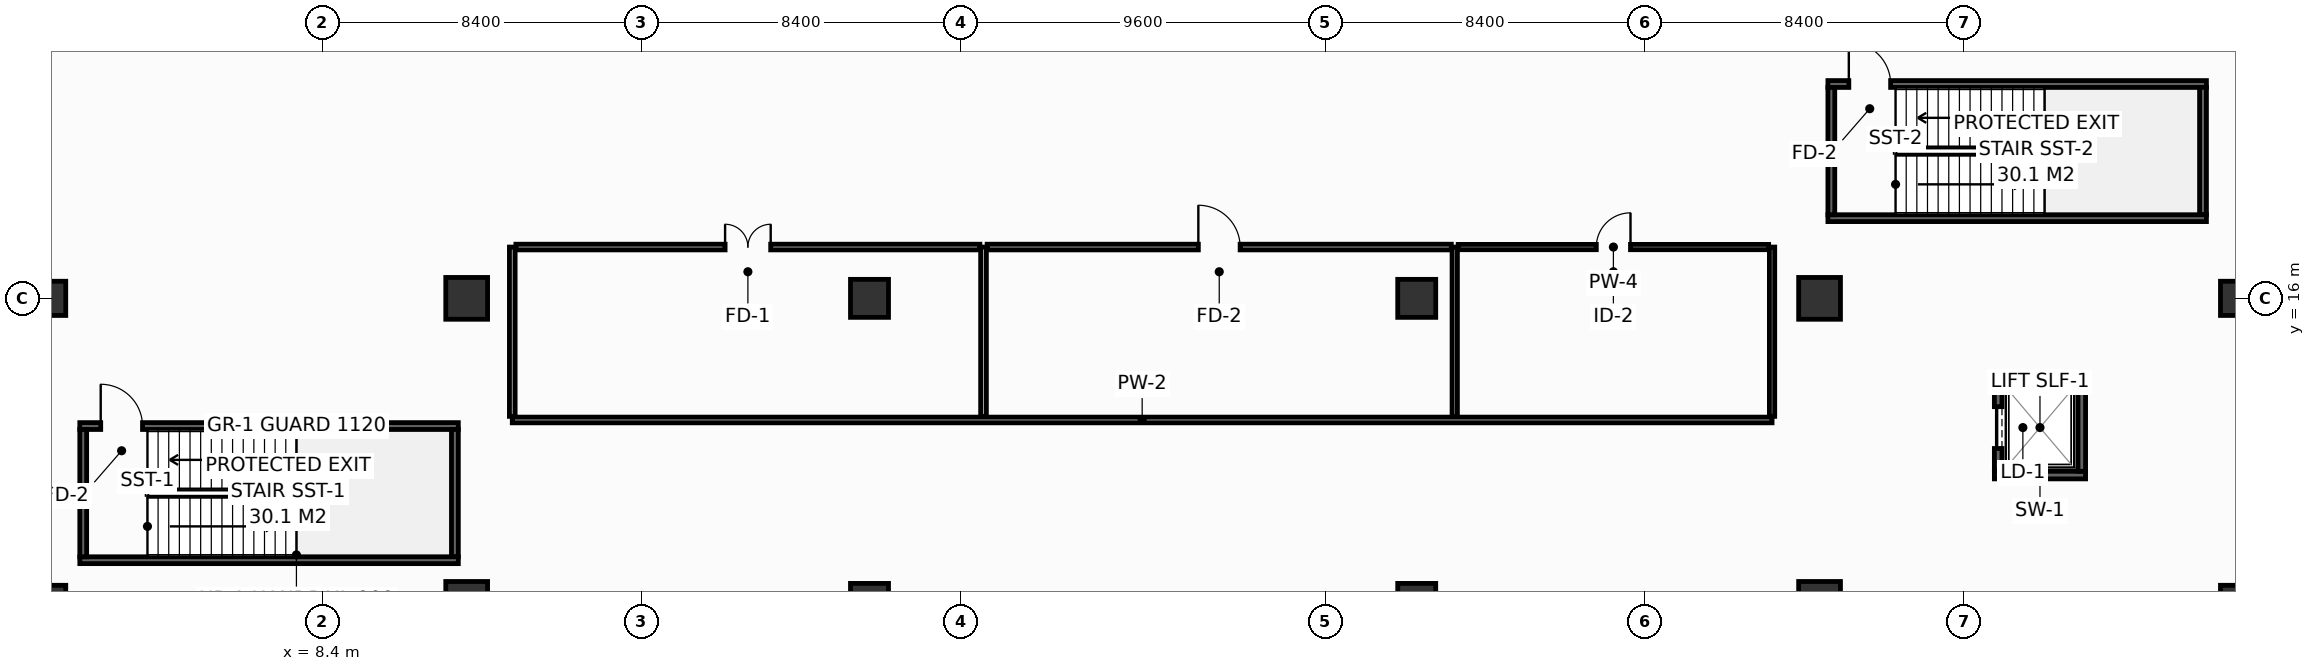
"""IFC4 building model, lengths in metres.
Left out: names, types, materials, properties, quantities, classifications, styles, units other than length and angle.
Written with IfcOpenShell. Run it as: python <this file> out.ifc"""

import sys

from ifc_helpers import new_model, si_unit, direction, frame, frame_2d, origin, origin_2d, place, context, subcontext, project, spatial, rectangle, extrude, element, fill, save


model = new_model("IFC4")
c1 = context("Model", 3, precision=1e-05, world=origin(), true_north=direction((0.0, 1.0)))
c2 = subcontext(c1, "Body", "Model", "MODEL_VIEW")
j1 = project(units=[si_unit("LENGTHUNIT", "METRE"), si_unit("PLANEANGLEUNIT", "RADIAN")], contexts=[c1])
p1 = place(None, origin())
s1 = spatial("IfcSite", under=j1, at=p1, CompositionType="ELEMENT")
p2 = place(p1, origin())
s2 = spatial("IfcBuilding", under=s1, at=p2, CompositionType="ELEMENT")
p3 = place(p2, frame((0.0, 0.0, -5.4)))
s3 = spatial("IfcBuildingStorey", under=s2, at=p3, CompositionType="ELEMENT", Elevation=-5.4)
p4 = place(p3, frame((12.2, 8.0, 0.0), z_axis=(0.0, 0.0, 1.0), x_axis=(1.0, 0.0, 0.0)))
e1 = element("IfcColumn", 1, at=p4, inside=s3, PredefinedType="COLUMN", context=c2, shape_type="SweptSolid", body=[
    extrude(rectangle(XDim=1.1, YDim=1.1, at=origin_2d()), origin(), (0.0, 0.0, 1.0), 5.4),
])
for number, where, z_axis, x_axis in (
    (2, (22.8, 8.0, 0.0), (0.0, 0.0, 1.0), (1.0, 0.0, 0.0)),
    (3, (37.2, 8.0, 0.0), (0.0, 0.0, 1.0), (1.0, 0.0, 0.0)),
):
    element("IfcColumn", number, at=place(p3, frame(where, z_axis=z_axis, x_axis=x_axis)), inside=s3, PredefinedType="COLUMN", context=c2, shape_type="SweptSolid", body=[
        extrude(rectangle(XDim=1.0, YDim=1.0, at=origin_2d()), origin(), (0.0, 0.0, 1.0), 5.4),
    ])
for number, where, z_axis, x_axis in (
    (4, (47.8, 8.0, 0.0), (0.0, 0.0, 1.0), (1.0, 0.0, 0.0)),
    (5, (12.2, 16.0, 0.0), (0.0, 0.0, 1.0), (1.0, 0.0, 0.0)),
):
    element("IfcColumn", number, at=place(p3, frame(where, z_axis=z_axis, x_axis=x_axis)), inside=s3, PredefinedType="COLUMN", context=c2, shape_type="SweptSolid", body=[
        extrude(rectangle(XDim=1.1, YDim=1.1, at=origin_2d()), origin(), (0.0, 0.0, 1.0), 5.4),
    ])
for number, where, z_axis, x_axis in (
    (6, (22.8, 16.0, 0.0), (0.0, 0.0, 1.0), (1.0, 0.0, 0.0)),
    (7, (37.2, 16.0, 0.0), (0.0, 0.0, 1.0), (1.0, 0.0, 0.0)),
):
    element("IfcColumn", number, at=place(p3, frame(where, z_axis=z_axis, x_axis=x_axis)), inside=s3, PredefinedType="COLUMN", context=c2, shape_type="SweptSolid", body=[
        extrude(rectangle(XDim=1.0, YDim=1.0, at=origin_2d()), origin(), (0.0, 0.0, 1.0), 5.4),
    ])
p5 = place(p3, frame((47.8, 16.0, 0.0), z_axis=(0.0, 0.0, 1.0), x_axis=(1.0, 0.0, 0.0)))
e8 = element("IfcColumn", 8, at=p5, inside=s3, PredefinedType="COLUMN", context=c2, shape_type="SweptSolid", body=[
    extrude(rectangle(XDim=1.1, YDim=1.1, at=origin_2d()), origin(), (0.0, 0.0, 1.0), 5.4),
])
for number, where, z_axis, x_axis in (
    (9, (1.2, 8.0, 0.0), (0.0, 0.0, 1.0), (1.0, 0.0, 0.0)),
    (10, (58.8, 8.0, 0.0), (0.0, 0.0, 1.0), (1.0, 0.0, 0.0)),
    (11, (1.2, 16.0, 0.0), (0.0, 0.0, 1.0), (1.0, 0.0, 0.0)),
    (12, (58.8, 16.0, 0.0), (0.0, 0.0, 1.0), (1.0, 0.0, 0.0)),
):
    element("IfcColumn", number, at=place(p3, frame(where, z_axis=z_axis, x_axis=x_axis)), inside=s3, PredefinedType="COLUMN", context=c2, shape_type="SweptSolid", body=[
        extrude(rectangle(XDim=0.9, YDim=0.9, at=origin_2d()), origin(), (0.0, 0.0, 1.0), 5.4),
    ])
for number, where, z_axis, x_axis in (
    (13, (52.4, 11.35, 0.0), (0.0, 0.0, 1.0), (1.0, 0.0, 0.0)),
    (14, (52.4, 13.85, 0.0), (0.0, 0.0, 1.0), (1.0, 0.0, 0.0)),
):
    element("IfcWall", number, at=place(p3, frame(where, z_axis=z_axis, x_axis=x_axis)), inside=s3, PredefinedType="SHEAR", context=c2, shape_type="SweptSolid", body=[
        extrude(rectangle(XDim=2.4, YDim=0.2, at=frame_2d((1.2, 0.0))), origin(), (0.0, 0.0, 1.0), 5.05),
    ])
p6 = place(p3, frame((52.5, 11.45, 0.0), z_axis=(0.0, 0.0, 1.0), x_axis=(0.0, 1.0, 0.0)))
e15 = element("IfcWall", 15, at=p6, inside=s3, PredefinedType="SHEAR", context=c2, shape_type="SweptSolid", body=[
    extrude(rectangle(XDim=2.3, YDim=0.2, at=frame_2d((1.15, 0.0))), origin(), (0.0, 0.0, 1.0), 5.05),
])
p7 = place(p6, frame((0.6, 0.0, 0.0)))
e16 = element("IfcOpeningElement", 16, at=p7, cuts=e15, PredefinedType="OPENING", context=c2, shape_type="SweptSolid", body=[
    extrude(rectangle(XDim=1.1, YDim=2.2, at=frame_2d((0.55, 1.1))), frame((0.0, 0.11, 0.0), z_axis=(0.0, -1.0, 0.0), x_axis=(1.0, 0.0, 0.0)), (0.0, 0.0, 1.0), 0.22),
])
p8 = place(p3, frame((54.7, 11.45, 0.0), z_axis=(0.0, 0.0, 1.0), x_axis=(0.0, 1.0, 0.0)))
e17 = element("IfcWall", 17, at=p8, inside=s3, PredefinedType="SHEAR", context=c2, shape_type="SweptSolid", body=[
    extrude(rectangle(XDim=2.3, YDim=0.2, at=frame_2d((1.15, 0.0))), origin(), (0.0, 0.0, 1.0), 5.05),
])
p9 = place(p3, frame((2.02, 12.64, 0.0), z_axis=(0.0, 0.0, 1.0), x_axis=(1.0, 0.0, 0.0)))
e18 = element("IfcWall", 18, at=p9, inside=s3, PredefinedType="SHEAR", context=c2, shape_type="SweptSolid", body=[
    extrude(rectangle(XDim=9.96, YDim=0.18, at=frame_2d((4.98, 0.0))), origin(), (0.0, 0.0, 1.0), 5.05),
])
p10 = place(p9, frame((0.55, 0.0, 0.0)))
e19 = element("IfcOpeningElement", 19, at=p10, cuts=e18, PredefinedType="OPENING", context=c2, shape_type="SweptSolid", body=[
    extrude(rectangle(XDim=1.1, YDim=2.15, at=frame_2d((0.55, 1.075))), frame((0.0, 0.1, 0.0), z_axis=(0.0, -1.0, 0.0), x_axis=(1.0, 0.0, 0.0)), (0.0, 0.0, 1.0), 0.2),
])
p11 = place(p3, frame((11.89, 12.55, 0.0), z_axis=(0.0, 0.0, 1.0), x_axis=(0.0, -1.0, 0.0)))
e20 = element("IfcWall", 20, at=p11, inside=s3, PredefinedType="SHEAR", context=c2, shape_type="SweptSolid", body=[
    extrude(rectangle(XDim=3.35, YDim=0.18, at=frame_2d((1.675, 0.0))), origin(), (0.0, 0.0, 1.0), 5.05),
])
p12 = place(p3, frame((11.98, 9.11, 0.0), z_axis=(0.0, 0.0, 1.0), x_axis=(-1.0, 0.0, 0.0)))
e21 = element("IfcWall", 21, at=p12, inside=s3, PredefinedType="SHEAR", context=c2, shape_type="SweptSolid", body=[
    extrude(rectangle(XDim=9.96, YDim=0.18, at=frame_2d((4.98, 0.0))), origin(), (0.0, 0.0, 1.0), 5.05),
])
p13 = place(p3, frame((2.11, 9.2, 0.0), z_axis=(0.0, 0.0, 1.0), x_axis=(0.0, 1.0, 0.0)))
e22 = element("IfcWall", 22, at=p13, inside=s3, PredefinedType="SHEAR", context=c2, shape_type="SweptSolid", body=[
    extrude(rectangle(XDim=3.35, YDim=0.18, at=frame_2d((1.675, 0.0))), origin(), (0.0, 0.0, 1.0), 5.05),
])
p14 = place(p3, frame((48.02, 21.64, 0.0), z_axis=(0.0, 0.0, 1.0), x_axis=(1.0, 0.0, 0.0)))
e23 = element("IfcWall", 23, at=p14, inside=s3, PredefinedType="SHEAR", context=c2, shape_type="SweptSolid", body=[
    extrude(rectangle(XDim=9.96, YDim=0.18, at=frame_2d((4.98, 0.0))), origin(), (0.0, 0.0, 1.0), 5.05),
])
p15 = place(p14, frame((0.55, 0.0, 0.0)))
e24 = element("IfcOpeningElement", 24, at=p15, cuts=e23, PredefinedType="OPENING", context=c2, shape_type="SweptSolid", body=[
    extrude(rectangle(XDim=1.1, YDim=2.15, at=frame_2d((0.55, 1.075))), frame((0.0, 0.1, 0.0), z_axis=(0.0, -1.0, 0.0), x_axis=(1.0, 0.0, 0.0)), (0.0, 0.0, 1.0), 0.2),
])
p16 = place(p3, frame((57.89, 21.55, 0.0), z_axis=(0.0, 0.0, 1.0), x_axis=(0.0, -1.0, 0.0)))
e25 = element("IfcWall", 25, at=p16, inside=s3, PredefinedType="SHEAR", context=c2, shape_type="SweptSolid", body=[
    extrude(rectangle(XDim=3.35, YDim=0.18, at=frame_2d((1.675, 0.0))), origin(), (0.0, 0.0, 1.0), 5.05),
])
p17 = place(p3, frame((57.98, 18.11, 0.0), z_axis=(0.0, 0.0, 1.0), x_axis=(-1.0, 0.0, 0.0)))
e26 = element("IfcWall", 26, at=p17, inside=s3, PredefinedType="SHEAR", context=c2, shape_type="SweptSolid", body=[
    extrude(rectangle(XDim=9.96, YDim=0.18, at=frame_2d((4.98, 0.0))), origin(), (0.0, 0.0, 1.0), 5.05),
])
p18 = place(p3, frame((48.11, 18.2, 0.0), z_axis=(0.0, 0.0, 1.0), x_axis=(0.0, 1.0, 0.0)))
e27 = element("IfcWall", 27, at=p18, inside=s3, PredefinedType="SHEAR", context=c2, shape_type="SweptSolid", body=[
    extrude(rectangle(XDim=3.35, YDim=0.18, at=frame_2d((1.675, 0.0))), origin(), (0.0, 0.0, 1.0), 5.05),
])
p19 = place(p3, frame((13.4, 12.8, 0.0), z_axis=(0.0, 0.0, 1.0), x_axis=(1.0, 0.0, 0.0)))
e28 = element("IfcWall", 28, at=p19, inside=s3, PredefinedType="PARTITIONING", context=c2, shape_type="SweptSolid", body=[
    extrude(rectangle(XDim=33.15, YDim=0.15, at=frame_2d((16.575, 0.0))), origin(), (0.0, 0.0, 1.0), 4.135),
])
for number, where, z_axis, x_axis in (
    (29, (13.4, 12.895, 0.0), (0.0, 0.0, 1.0), (0.0, 1.0, 0.0)),
    (30, (25.8, 12.895, 0.0), (0.0, 0.0, 1.0), (0.0, 1.0, 0.0)),
):
    element("IfcWall", number, at=place(p3, frame(where, z_axis=z_axis, x_axis=x_axis)), inside=s3, PredefinedType="PARTITIONING", context=c2, shape_type="SweptSolid", body=[
        extrude(rectangle(XDim=4.455, YDim=0.15, at=frame_2d((2.228, 0.0))), origin(), (0.0, 0.0, 1.0), 4.135),
    ])
for number, where, z_axis, x_axis in (
    (31, (38.2, 12.895, 0.0), (0.0, 0.0, 1.0), (0.0, 1.0, 0.0)),
    (32, (46.55, 12.895, 0.0), (0.0, 0.0, 1.0), (0.0, 1.0, 0.0)),
):
    element("IfcWall", number, at=place(p3, frame(where, z_axis=z_axis, x_axis=x_axis)), inside=s3, PredefinedType="PARTITIONING", context=c2, shape_type="SweptSolid", body=[
        extrude(rectangle(XDim=4.455, YDim=0.14, at=frame_2d((2.228, 0.0))), origin(), (0.0, 0.0, 1.0), 4.135),
    ])
p20 = place(p3, frame((13.495, 17.35, 0.0), z_axis=(0.0, 0.0, 1.0), x_axis=(1.0, 0.0, 0.0)))
e33 = element("IfcWall", 33, at=p20, inside=s3, PredefinedType="PARTITIONING", context=c2, shape_type="SweptSolid", body=[
    extrude(rectangle(XDim=12.21, YDim=0.15, at=frame_2d((6.105, 0.0))), origin(), (0.0, 0.0, 1.0), 4.135),
])
p21 = place(p20, frame((5.505, 0.0, 0.0)))
e34 = element("IfcOpeningElement", 34, at=p21, cuts=e33, PredefinedType="OPENING", context=c2, shape_type="SweptSolid", body=[
    extrude(rectangle(XDim=1.2, YDim=2.15, at=frame_2d((0.6, 1.075))), frame((0.0, 0.085, 0.0), z_axis=(0.0, -1.0, 0.0), x_axis=(1.0, 0.0, 0.0)), (0.0, 0.0, 1.0), 0.17),
])
p22 = place(p3, frame((25.895, 17.35, 0.0), z_axis=(0.0, 0.0, 1.0), x_axis=(1.0, 0.0, 0.0)))
e35 = element("IfcWall", 35, at=p22, inside=s3, PredefinedType="PARTITIONING", context=c2, shape_type="SweptSolid", body=[
    extrude(rectangle(XDim=12.215, YDim=0.15, at=frame_2d((6.107, 0.0))), origin(), (0.0, 0.0, 1.0), 4.135),
])
p23 = place(p22, frame((5.558, 0.0, 0.0)))
e36 = element("IfcOpeningElement", 36, at=p23, cuts=e35, PredefinedType="OPENING", context=c2, shape_type="SweptSolid", body=[
    extrude(rectangle(XDim=1.1, YDim=2.15, at=frame_2d((0.55, 1.075))), frame((0.0, 0.085, 0.0), z_axis=(0.0, -1.0, 0.0), x_axis=(1.0, 0.0, 0.0)), (0.0, 0.0, 1.0), 0.17),
])
p24 = place(p3, frame((38.29, 17.35, 0.0), z_axis=(0.0, 0.0, 1.0), x_axis=(1.0, 0.0, 0.0)))
e37 = element("IfcWall", 37, at=p24, inside=s3, PredefinedType="PARTITIONING", context=c2, shape_type="SweptSolid", body=[
    extrude(rectangle(XDim=8.17, YDim=0.14, at=frame_2d((4.085, 0.0))), origin(), (0.0, 0.0, 1.0), 5.05),
])
p25 = place(p24, frame((3.635, 0.0, 0.0)))
e38 = element("IfcOpeningElement", 38, at=p25, cuts=e37, PredefinedType="OPENING", context=c2, shape_type="SweptSolid", body=[
    extrude(rectangle(XDim=0.9, YDim=2.1, at=frame_2d((0.45, 1.05))), frame((0.0, 0.08, 0.0), z_axis=(0.0, -1.0, 0.0), x_axis=(1.0, 0.0, 0.0)), (0.0, 0.0, 1.0), 0.16),
])
p26 = place(p7, origin())
e39 = element("IfcDoor", 39, at=p26, inside=s3, OperationType="SLIDING_TO_LEFT", PredefinedType="DOOR", context=c2, shape_type="SweptSolid", body=[
    extrude(rectangle(XDim=1.1, YDim=2.2, at=frame_2d((0.55, 1.1))), frame((0.0, 0.025, 0.0), z_axis=(0.0, -1.0, 0.0), x_axis=(1.0, 0.0, 0.0)), (0.0, 0.0, 1.0), 0.05),
])
fill(e16, e39)
p27 = place(p10, origin())
e40 = element("IfcDoor", 40, at=p27, inside=s3, OperationType="SINGLE_SWING_LEFT", PredefinedType="DOOR", context=c2, shape_type="SweptSolid", body=[
    extrude(rectangle(XDim=1.1, YDim=2.15, at=frame_2d((0.55, 1.075))), frame((0.0, 0.025, 0.0), z_axis=(0.0, -1.0, 0.0), x_axis=(1.0, 0.0, 0.0)), (0.0, 0.0, 1.0), 0.05),
])
fill(e19, e40)
p28 = place(p15, origin())
e41 = element("IfcDoor", 41, at=p28, inside=s3, OperationType="SINGLE_SWING_LEFT", PredefinedType="DOOR", context=c2, shape_type="SweptSolid", body=[
    extrude(rectangle(XDim=1.1, YDim=2.15, at=frame_2d((0.55, 1.075))), frame((0.0, 0.025, 0.0), z_axis=(0.0, -1.0, 0.0), x_axis=(1.0, 0.0, 0.0)), (0.0, 0.0, 1.0), 0.05),
])
fill(e24, e41)
p29 = place(p21, origin())
e42 = element("IfcDoor", 42, at=p29, inside=s3, OperationType="DOUBLE_DOOR_SINGLE_SWING", PredefinedType="DOOR", context=c2, shape_type="SweptSolid", body=[
    extrude(rectangle(XDim=1.2, YDim=2.15, at=frame_2d((0.6, 1.075))), frame((0.0, 0.025, 0.0), z_axis=(0.0, -1.0, 0.0), x_axis=(1.0, 0.0, 0.0)), (0.0, 0.0, 1.0), 0.05),
])
fill(e34, e42)
p30 = place(p23, origin())
e43 = element("IfcDoor", 43, at=p30, inside=s3, OperationType="SINGLE_SWING_LEFT", PredefinedType="DOOR", context=c2, shape_type="SweptSolid", body=[
    extrude(rectangle(XDim=1.1, YDim=2.15, at=frame_2d((0.55, 1.075))), frame((0.0, 0.025, 0.0), z_axis=(0.0, -1.0, 0.0), x_axis=(1.0, 0.0, 0.0)), (0.0, 0.0, 1.0), 0.05),
])
fill(e36, e43)
p31 = place(p25, origin())
e44 = element("IfcDoor", 44, at=p31, inside=s3, OperationType="SINGLE_SWING_RIGHT", PredefinedType="DOOR", context=c2, shape_type="SweptSolid", body=[
    extrude(rectangle(XDim=0.9, YDim=2.1, at=frame_2d((0.45, 1.05))), frame((0.0, 0.025, 0.0), z_axis=(0.0, -1.0, 0.0), x_axis=(1.0, 0.0, 0.0)), (0.0, 0.0, 1.0), 0.05),
])
fill(e38, e44)
save(model, sys.argv[1])
